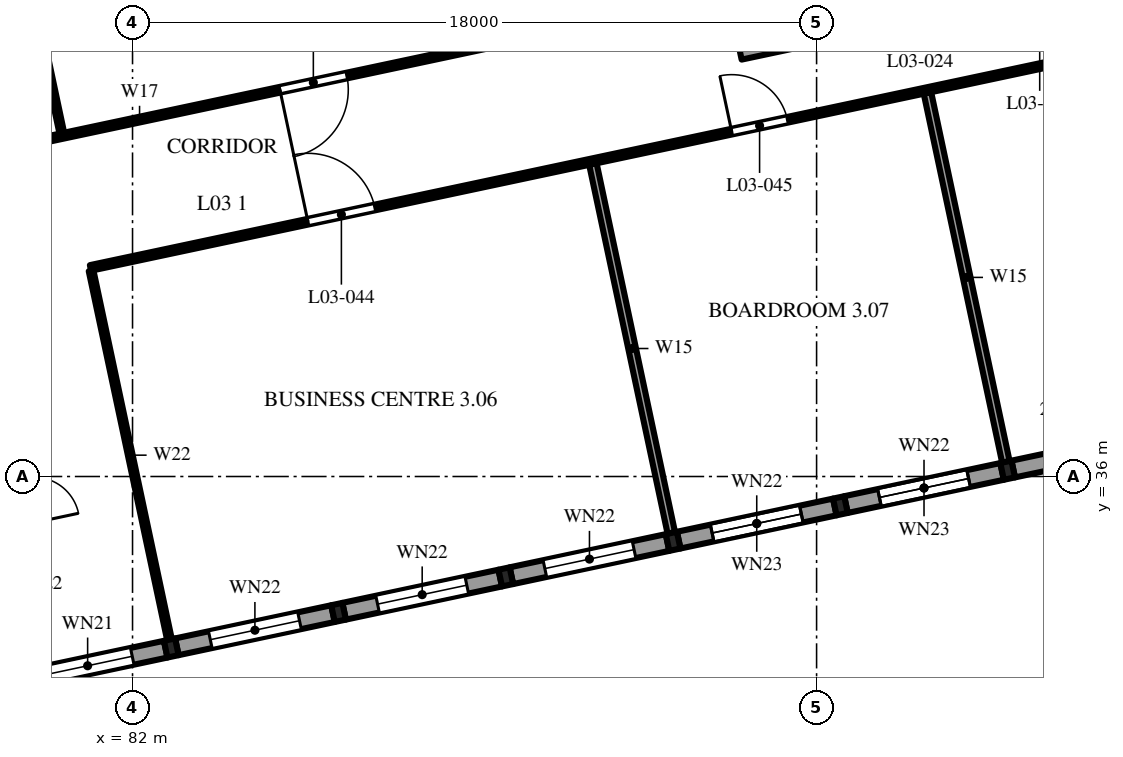
"""IFC4 building model, lengths in metres.
Left out: names, types, materials, properties, quantities, classifications, styles, units other than length and angle.
Written with IfcOpenShell. Run it as: python <this file> out.ifc"""

import sys

from ifc_helpers import new_model, si_unit, direction, frame, frame_2d, origin, origin_2d, place, context, subcontext, project, spatial, polyline, rectangle, i_section, outline, extrude, element, fill, save


model = new_model("IFC4")
c1 = context("Model", 3, precision=1e-05, world=origin(), true_north=direction((0.0, 1.0)))
c2 = subcontext(c1, "Body", "Model", "MODEL_VIEW")
j1 = project(units=[si_unit("LENGTHUNIT", "METRE"), si_unit("PLANEANGLEUNIT", "RADIAN")], contexts=[c1])
p1 = place(None, origin())
s1 = spatial("IfcSite", under=j1, at=p1, CompositionType="ELEMENT")
p2 = place(p1, origin())
s2 = spatial("IfcBuilding", under=s1, at=p2, CompositionType="ELEMENT")
p3 = place(p2, frame((0.0, 0.0, 16.8)))
s3 = spatial("IfcBuildingStorey", under=s2, at=p3, CompositionType="ELEMENT", Elevation=16.8)
for number, where, z_axis, x_axis in (
    (1, (83.019, 31.487, 0.0), (0.0, 0.0, 1.0), (0.978, 0.208, 0.0)),
    (2, (87.421, 32.423, 0.0), (0.0, 0.0, 1.0), (0.978, 0.208, 0.0)),
    (3, (91.823, 33.358, 0.0), (0.0, 0.0, 1.0), (0.978, 0.208, 0.0)),
    (4, (96.224, 34.294, 0.0), (0.0, 0.0, 1.0), (0.978, 0.208, 0.0)),
    (5, (100.626, 35.23, 0.0), (0.0, 0.0, 1.0), (0.978, 0.208, 0.0)),
    (6, (105.028, 36.165, 0.0), (0.0, 0.0, 1.0), (0.978, 0.208, 0.0)),
):
    element("IfcColumn", number, at=place(p3, frame(where, z_axis=z_axis, x_axis=x_axis)), inside=s3, PredefinedType="COLUMN", context=c2, shape_type="SweptSolid", body=[
        extrude(i_section(OverallWidth=0.3, OverallDepth=0.45, WebThickness=0.014, FlangeThickness=0.026, FilletRadius=0.027, at=origin_2d()), origin(), (0.0, 0.0, 1.0), 4.8),
    ])
p4 = place(p3, frame((97.997, 47.118, 0.0), z_axis=(0.0, 0.0, 1.0), x_axis=(0.978147662755, 0.20791139903, 0.0)))
e7 = element("IfcWall", 7, at=p4, inside=s3, PredefinedType="SHEAR", context=c2, shape_type="SweptSolid", body=[
    extrude(outline(polyline([(0.0, 0.0), (13.7, 0.0), (13.7, 9.076), (0.0, 8.344), (0.0, 0.0)])), frame((0.0, 0.15, 0.0), z_axis=(0.0, -1.0, 0.0), x_axis=(1.0, 0.0, 0.0)), (0.0, 0.0, 1.0), 0.3),
])
p5 = place(p4, frame((5.1, 0.0, 0.0)))
e8 = element("IfcOpeningElement", 8, at=p5, cuts=e7, PredefinedType="OPENING", context=c2, shape_type="SweptSolid", body=[
    extrude(rectangle(XDim=1.1, YDim=2.1, at=frame_2d((0.55, 1.05))), frame((0.0, 0.16, 0.0), z_axis=(0.0, -1.0, 0.0), x_axis=(1.0, 0.0, 0.0)), (0.0, 0.0, 1.0), 0.32),
])
p6 = place(p4, frame((7.5, 0.0, 0.0)))
e9 = element("IfcOpeningElement", 9, at=p6, cuts=e7, PredefinedType="OPENING", context=c2, shape_type="SweptSolid", body=[
    extrude(rectangle(XDim=1.1, YDim=2.1, at=frame_2d((0.55, 1.05))), frame((0.0, 0.16, 0.0), z_axis=(0.0, -1.0, 0.0), x_axis=(1.0, 0.0, 0.0)), (0.0, 0.0, 1.0), 0.32),
])
p7 = place(p3, frame((78.764, 30.583, 0.0), z_axis=(0.0, 0.0, 1.0), x_axis=(0.978143927149, 0.207928972925, 0.0)))
e10 = element("IfcWall", 10, at=p7, inside=s3, PredefinedType="SOLIDWALL", context=c2, shape_type="SweptSolid", body=[
    extrude(outline(polyline([(0.0, 0.0), (4.2, 0.0), (4.2, 9.316), (0.0, 9.091), (0.0, 0.0)])), frame((0.0, 0.225, 0.0), z_axis=(0.0, -1.0, 0.0), x_axis=(1.0, 0.0, 0.0)), (0.0, 0.0, 1.0), 0.45),
])
p8 = place(p7, frame((0.9, 0.0, 0.45)))
e11 = element("IfcOpeningElement", 11, at=p8, cuts=e10, PredefinedType="OPENING", context=c2, shape_type="SweptSolid", body=[
    extrude(rectangle(XDim=2.4, YDim=3.3, at=frame_2d((1.2, 1.65))), frame((0.0, 0.235, 0.0), z_axis=(0.0, -1.0, 0.0), x_axis=(1.0, 0.0, 0.0)), (0.0, 0.0, 1.0), 0.47),
])
p9 = place(p3, frame((83.166, 31.519, 0.0), z_axis=(0.0, 0.0, 1.0), x_axis=(0.978155748334, 0.207873355681, 0.0)))
e12 = element("IfcWall", 12, at=p9, inside=s3, PredefinedType="SOLIDWALL", context=c2, shape_type="SweptSolid", body=[
    extrude(outline(polyline([(0.0, 0.0), (4.2, 0.0), (4.2, 9.557), (0.0, 9.332), (0.0, 0.0)])), frame((0.0, 0.225, 0.0), z_axis=(0.0, -1.0, 0.0), x_axis=(1.0, 0.0, 0.0)), (0.0, 0.0, 1.0), 0.45),
])
p10 = place(p9, frame((0.9, 0.0, 0.9)))
e13 = element("IfcOpeningElement", 13, at=p10, cuts=e12, PredefinedType="OPENING", context=c2, shape_type="SweptSolid", body=[
    extrude(rectangle(XDim=2.4, YDim=2.4, at=frame_2d((1.2, 1.2))), frame((0.0, 0.235, 0.0), z_axis=(0.0, -1.0, 0.0), x_axis=(1.0, 0.0, 0.0)), (0.0, 0.0, 1.0), 0.47),
])
p11 = place(p3, frame((87.568, 32.454, 0.0), z_axis=(0.0, 0.0, 1.0), x_axis=(0.97815826, 0.207861536591, 0.0)))
e14 = element("IfcWall", 14, at=p11, inside=s3, PredefinedType="SOLIDWALL", context=c2, shape_type="SweptSolid", body=[
    extrude(outline(polyline([(0.0, 0.0), (4.2, 0.0), (4.2, 9.797), (0.0, 9.573), (0.0, 0.0)])), frame((0.0, 0.225, 0.0), z_axis=(0.0, -1.0, 0.0), x_axis=(1.0, 0.0, 0.0)), (0.0, 0.0, 1.0), 0.45),
])
p12 = place(p11, frame((0.9, 0.0, 0.9)))
e15 = element("IfcOpeningElement", 15, at=p12, cuts=e14, PredefinedType="OPENING", context=c2, shape_type="SweptSolid", body=[
    extrude(rectangle(XDim=2.4, YDim=2.4, at=frame_2d((1.2, 1.2))), frame((0.0, 0.235, 0.0), z_axis=(0.0, -1.0, 0.0), x_axis=(1.0, 0.0, 0.0)), (0.0, 0.0, 1.0), 0.47),
])
p13 = place(p3, frame((91.969, 33.39, 0.0), z_axis=(0.0, 0.0, 1.0), x_axis=(0.978143927149, 0.207928972925, 0.0)))
e16 = element("IfcWall", 16, at=p13, inside=s3, PredefinedType="SOLIDWALL", context=c2, shape_type="SweptSolid", body=[
    extrude(outline(polyline([(0.0, 0.0), (4.2, 0.0), (4.2, 10.038), (0.0, 9.813), (0.0, 0.0)])), frame((0.0, 0.225, 0.0), z_axis=(0.0, -1.0, 0.0), x_axis=(1.0, 0.0, 0.0)), (0.0, 0.0, 1.0), 0.45),
])
p14 = place(p13, frame((0.9, 0.0, 0.9)))
e17 = element("IfcOpeningElement", 17, at=p14, cuts=e16, PredefinedType="OPENING", context=c2, shape_type="SweptSolid", body=[
    extrude(rectangle(XDim=2.4, YDim=2.4, at=frame_2d((1.2, 1.2))), frame((0.0, 0.235, 0.0), z_axis=(0.0, -1.0, 0.0), x_axis=(1.0, 0.0, 0.0)), (0.0, 0.0, 1.0), 0.47),
])
p15 = place(p3, frame((96.371, 34.325, 0.0), z_axis=(0.0, 0.0, 1.0), x_axis=(0.978143927149, 0.207928972925, 0.0)))
e18 = element("IfcWall", 18, at=p15, inside=s3, PredefinedType="SOLIDWALL", context=c2, shape_type="SweptSolid", body=[
    extrude(outline(polyline([(0.0, 0.0), (4.2, 0.0), (4.2, 10.279), (0.0, 10.054), (0.0, 0.0)])), frame((0.0, 0.225, 0.0), z_axis=(0.0, -1.0, 0.0), x_axis=(1.0, 0.0, 0.0)), (0.0, 0.0, 1.0), 0.45),
])
p16 = place(p15, frame((0.9, 0.0, 0.6)))
e19 = element("IfcOpeningElement", 19, at=p16, cuts=e18, PredefinedType="OPENING", context=c2, shape_type="SweptSolid", body=[
    extrude(rectangle(XDim=2.4, YDim=2.7, at=frame_2d((1.2, 1.35))), frame((0.0, 0.235, 0.0), z_axis=(0.0, -1.0, 0.0), x_axis=(1.0, 0.0, 0.0)), (0.0, 0.0, 1.0), 0.47),
])
p17 = place(p15, frame((0.9, 0.0, 5.1)))
e20 = element("IfcOpeningElement", 20, at=p17, cuts=e18, PredefinedType="OPENING", context=c2, shape_type="SweptSolid", body=[
    extrude(rectangle(XDim=2.4, YDim=2.4, at=frame_2d((1.2, 1.2))), frame((0.0, 0.235, 0.0), z_axis=(0.0, -1.0, 0.0), x_axis=(1.0, 0.0, 0.0)), (0.0, 0.0, 1.0), 0.47),
])
p18 = place(p3, frame((100.773, 35.261, 0.0), z_axis=(0.0, 0.0, 1.0), x_axis=(0.978143927149, 0.207928972925, 0.0)))
e21 = element("IfcWall", 21, at=p18, inside=s3, PredefinedType="SOLIDWALL", context=c2, shape_type="SweptSolid", body=[
    extrude(outline(polyline([(0.0, 0.0), (4.2, 0.0), (4.2, 10.52), (0.0, 10.295), (0.0, 0.0)])), frame((0.0, 0.225, 0.0), z_axis=(0.0, -1.0, 0.0), x_axis=(1.0, 0.0, 0.0)), (0.0, 0.0, 1.0), 0.45),
])
p19 = place(p18, frame((0.9, 0.0, 0.6)))
e22 = element("IfcOpeningElement", 22, at=p19, cuts=e21, PredefinedType="OPENING", context=c2, shape_type="SweptSolid", body=[
    extrude(rectangle(XDim=2.4, YDim=2.7, at=frame_2d((1.2, 1.35))), frame((0.0, 0.235, 0.0), z_axis=(0.0, -1.0, 0.0), x_axis=(1.0, 0.0, 0.0)), (0.0, 0.0, 1.0), 0.47),
])
p20 = place(p18, frame((0.9, 0.0, 5.1)))
e23 = element("IfcOpeningElement", 23, at=p20, cuts=e21, PredefinedType="OPENING", context=c2, shape_type="SweptSolid", body=[
    extrude(rectangle(XDim=2.4, YDim=2.4, at=frame_2d((1.2, 1.2))), frame((0.0, 0.235, 0.0), z_axis=(0.0, -1.0, 0.0), x_axis=(1.0, 0.0, 0.0)), (0.0, 0.0, 1.0), 0.47),
])
p21 = place(p3, frame((105.174, 36.197, 0.0), z_axis=(0.0, 0.0, 1.0), x_axis=(0.978155748334, 0.207873355681, 0.0)))
e24 = element("IfcWall", 24, at=p21, inside=s3, PredefinedType="SOLIDWALL", context=c2, shape_type="SweptSolid", body=[
    extrude(outline(polyline([(0.0, 0.0), (4.2, 0.0), (4.2, 10.76), (0.0, 10.536), (0.0, 0.0)])), frame((0.0, 0.225, 0.0), z_axis=(0.0, -1.0, 0.0), x_axis=(1.0, 0.0, 0.0)), (0.0, 0.0, 1.0), 0.45),
])
p22 = place(p21, frame((0.9, 0.0, 0.9)))
e25 = element("IfcOpeningElement", 25, at=p22, cuts=e24, PredefinedType="OPENING", context=c2, shape_type="SweptSolid", body=[
    extrude(rectangle(XDim=2.4, YDim=2.4, at=frame_2d((1.2, 1.2))), frame((0.0, 0.235, 0.0), z_axis=(0.0, -1.0, 0.0), x_axis=(1.0, 0.0, 0.0)), (0.0, 0.0, 1.0), 0.47),
])
p23 = place(p21, frame((0.9, 0.0, 5.1)))
e26 = element("IfcOpeningElement", 26, at=p23, cuts=e24, PredefinedType="OPENING", context=c2, shape_type="SweptSolid", body=[
    extrude(rectangle(XDim=2.4, YDim=2.4, at=frame_2d((1.2, 1.2))), frame((0.0, 0.235, 0.0), z_axis=(0.0, -1.0, 0.0), x_axis=(1.0, 0.0, 0.0)), (0.0, 0.0, 1.0), 0.47),
])
p24 = place(p3, frame((80.893, 41.489, 0.0), z_axis=(0.0, 0.0, 1.0), x_axis=(0.97814724207, 0.20791337819, 0.0)))
e27 = element("IfcWall", 27, at=p24, inside=s3, PredefinedType="PARTITIONING", context=c2, shape_type="SweptSolid", body=[
    extrude(outline(polyline([(0.0, 0.0), (49.5, 0.0), (49.5, 9.336), (0.0, 6.688), (0.0, 0.0)])), frame((0.0, 0.075, 0.0), z_axis=(0.0, -1.0, 0.0), x_axis=(1.0, 0.0, 0.0)), (0.0, 0.0, 1.0), 0.15),
])
p25 = place(p24, frame((5.85, 0.0, 0.0)))
e28 = element("IfcOpeningElement", 28, at=p25, cuts=e27, PredefinedType="OPENING", context=c2, shape_type="SweptSolid", body=[
    extrude(rectangle(XDim=1.8, YDim=2.1, at=frame_2d((0.9, 1.05))), frame((0.0, 0.085, 0.0), z_axis=(0.0, -1.0, 0.0), x_axis=(1.0, 0.0, 0.0)), (0.0, 0.0, 1.0), 0.17),
])
p26 = place(p24, frame((17.25, 0.0, 0.0)))
e29 = element("IfcOpeningElement", 29, at=p26, cuts=e27, PredefinedType="OPENING", context=c2, shape_type="SweptSolid", body=[
    extrude(rectangle(XDim=1.5, YDim=2.1, at=frame_2d((0.75, 1.05))), frame((0.0, 0.085, 0.0), z_axis=(0.0, -1.0, 0.0), x_axis=(1.0, 0.0, 0.0)), (0.0, 0.0, 1.0), 0.17),
])
p27 = place(p24, frame((28.35, 0.0, 0.0)))
e30 = element("IfcOpeningElement", 30, at=p27, cuts=e27, PredefinedType="OPENING", context=c2, shape_type="SweptSolid", body=[
    extrude(rectangle(XDim=1.8, YDim=2.1, at=frame_2d((0.9, 1.05))), frame((0.0, 0.085, 0.0), z_axis=(0.0, -1.0, 0.0), x_axis=(1.0, 0.0, 0.0)), (0.0, 0.0, 1.0), 0.17),
])
p28 = place(p24, frame((41.85, 0.0, 0.0)))
e31 = element("IfcOpeningElement", 31, at=p28, cuts=e27, PredefinedType="OPENING", context=c2, shape_type="SweptSolid", body=[
    extrude(rectangle(XDim=1.8, YDim=2.1, at=frame_2d((0.9, 1.05))), frame((0.0, 0.085, 0.0), z_axis=(0.0, -1.0, 0.0), x_axis=(1.0, 0.0, 0.0)), (0.0, 0.0, 1.0), 0.17),
])
p29 = place(p3, frame((82.972, 31.707, 0.0), z_axis=(0.0, 0.0, 1.0), x_axis=(-0.207904355568, 0.978149159861, 0.0)))
e32 = element("IfcWall", 32, at=p29, inside=s3, PredefinedType="PARTITIONING", context=c2, shape_type="SweptSolid", body=[
    extrude(outline(polyline([(0.0, 0.0), (9.925, 0.0), (9.925, 5.973), (0.0, 5.973), (0.0, 0.0)])), frame((0.0, 0.062, 0.0), z_axis=(0.0, -1.0, 0.0), x_axis=(1.0, 0.0, 0.0)), (0.0, 0.0, 1.0), 0.125),
])
p30 = place(p3, frame((96.177, 34.514, 0.0), z_axis=(0.0, 0.0, 1.0), x_axis=(-0.20790935802, 0.978148096582, 0.0)))
e33 = element("IfcWall", 33, at=p30, inside=s3, PredefinedType="PARTITIONING", context=c2, shape_type="SweptSolid", body=[
    extrude(outline(polyline([(0.0, 0.0), (9.925, 0.0), (9.925, 6.696), (0.0, 6.696), (0.0, 0.0)])), frame((0.0, 0.1, 0.0), z_axis=(0.0, -1.0, 0.0), x_axis=(1.0, 0.0, 0.0)), (0.0, 0.0, 1.0), 0.2),
])
p31 = place(p3, frame((104.981, 36.385, 0.0), z_axis=(0.0, 0.0, 1.0), x_axis=(-0.207927890391, 0.978144157268, 0.0)))
e34 = element("IfcWall", 34, at=p31, inside=s3, PredefinedType="PARTITIONING", context=c2, shape_type="SweptSolid", body=[
    extrude(outline(polyline([(0.0, 0.0), (9.925, 0.0), (9.925, 7.896), (0.0, 8.097), (0.0, 0.0)])), frame((0.0, 0.1, 0.0), z_axis=(0.0, -1.0, 0.0), x_axis=(1.0, 0.0, 0.0)), (0.0, 0.0, 1.0), 0.2),
])
p32 = place(p3, frame((59.663, 40.605, 0.0), z_axis=(0.0, 0.0, 1.0), x_axis=(0.978147466509, 0.207912322295, 0.0)))
e35 = element("IfcWall", 35, at=p32, inside=s3, PredefinedType="PARTITIONING", context=c2, shape_type="SweptSolid", body=[
    extrude(outline(polyline([(0.0, 0.0), (34.45, 0.0), (34.45, 7.224), (0.0, 5.381), (0.0, 0.0)])), frame((0.0, 0.075, 0.0), z_axis=(0.0, -1.0, 0.0), x_axis=(1.0, 0.0, 0.0)), (0.0, 0.0, 1.0), 0.15),
])
p33 = place(p32, frame((3.225, 0.0, 0.0)))
e36 = element("IfcOpeningElement", 36, at=p33, cuts=e35, PredefinedType="OPENING", context=c2, shape_type="SweptSolid", body=[
    extrude(rectangle(XDim=1.0, YDim=2.1, at=frame_2d((0.5, 1.05))), frame((0.0, 0.085, 0.0), z_axis=(0.0, -1.0, 0.0), x_axis=(1.0, 0.0, 0.0)), (0.0, 0.0, 1.0), 0.17),
])
p34 = place(p32, frame((9.25, 0.0, 0.0)))
e37 = element("IfcOpeningElement", 37, at=p34, cuts=e35, PredefinedType="OPENING", context=c2, shape_type="SweptSolid", body=[
    extrude(rectangle(XDim=0.9, YDim=2.1, at=frame_2d((0.45, 1.05))), frame((0.0, 0.085, 0.0), z_axis=(0.0, -1.0, 0.0), x_axis=(1.0, 0.0, 0.0)), (0.0, 0.0, 1.0), 0.17),
])
p35 = place(p32, frame((13.75, 0.0, 0.0)))
e38 = element("IfcOpeningElement", 38, at=p35, cuts=e35, PredefinedType="OPENING", context=c2, shape_type="SweptSolid", body=[
    extrude(rectangle(XDim=0.9, YDim=2.1, at=frame_2d((0.45, 1.05))), frame((0.0, 0.085, 0.0), z_axis=(0.0, -1.0, 0.0), x_axis=(1.0, 0.0, 0.0)), (0.0, 0.0, 1.0), 0.17),
])
p36 = place(p32, frame((18.15, 0.0, 0.0)))
e39 = element("IfcOpeningElement", 39, at=p36, cuts=e35, PredefinedType="OPENING", context=c2, shape_type="SweptSolid", body=[
    extrude(rectangle(XDim=1.1, YDim=2.1, at=frame_2d((0.55, 1.05))), frame((0.0, 0.085, 0.0), z_axis=(0.0, -1.0, 0.0), x_axis=(1.0, 0.0, 0.0)), (0.0, 0.0, 1.0), 0.17),
])
p37 = place(p32, frame((26.8, 0.0, 0.0)))
e40 = element("IfcOpeningElement", 40, at=p37, cuts=e35, PredefinedType="OPENING", context=c2, shape_type="SweptSolid", body=[
    extrude(rectangle(XDim=1.8, YDim=2.1, at=frame_2d((0.9, 1.05))), frame((0.0, 0.085, 0.0), z_axis=(0.0, -1.0, 0.0), x_axis=(1.0, 0.0, 0.0)), (0.0, 0.0, 1.0), 0.17),
])
p38 = place(p3, frame((78.076, 54.743, 0.0), z_axis=(0.0, 0.0, 1.0), x_axis=(0.20790935802, -0.978148096582, 0.0)))
e41 = element("IfcWall", 41, at=p38, inside=s3, PredefinedType="PARTITIONING", context=c2, shape_type="SweptSolid", body=[
    extrude(outline(polyline([(0.0, 0.0), (9.925, 0.0), (9.925, 5.973), (0.0, 5.973), (0.0, 0.0)])), frame((0.0, 0.062, 0.0), z_axis=(0.0, -1.0, 0.0), x_axis=(1.0, 0.0, 0.0)), (0.0, 0.0, 1.0), 0.125),
])
p39 = place(p8, origin())
e42 = element("IfcWindow", 42, at=p39, inside=s3, PartitioningType="DOUBLE_PANEL_VERTICAL", PredefinedType="WINDOW", context=c2, shape_type="SweptSolid", body=[
    extrude(rectangle(XDim=2.4, YDim=3.3, at=frame_2d((1.2, 1.65))), frame((0.0, 0.03, 0.0), z_axis=(0.0, -1.0, 0.0), x_axis=(1.0, 0.0, 0.0)), (0.0, 0.0, 1.0), 0.06),
])
fill(e11, e42)
p40 = place(p10, origin())
e43 = element("IfcWindow", 43, at=p40, inside=s3, PartitioningType="SINGLE_PANEL", PredefinedType="WINDOW", context=c2, shape_type="SweptSolid", body=[
    extrude(rectangle(XDim=2.4, YDim=2.4, at=frame_2d((1.2, 1.2))), frame((0.0, 0.03, 0.0), z_axis=(0.0, -1.0, 0.0), x_axis=(1.0, 0.0, 0.0)), (0.0, 0.0, 1.0), 0.06),
])
fill(e13, e43)
p41 = place(p12, origin())
e44 = element("IfcWindow", 44, at=p41, inside=s3, PartitioningType="SINGLE_PANEL", PredefinedType="WINDOW", context=c2, shape_type="SweptSolid", body=[
    extrude(rectangle(XDim=2.4, YDim=2.4, at=frame_2d((1.2, 1.2))), frame((0.0, 0.03, 0.0), z_axis=(0.0, -1.0, 0.0), x_axis=(1.0, 0.0, 0.0)), (0.0, 0.0, 1.0), 0.06),
])
fill(e15, e44)
p42 = place(p14, origin())
e45 = element("IfcWindow", 45, at=p42, inside=s3, PartitioningType="SINGLE_PANEL", PredefinedType="WINDOW", context=c2, shape_type="SweptSolid", body=[
    extrude(rectangle(XDim=2.4, YDim=2.4, at=frame_2d((1.2, 1.2))), frame((0.0, 0.03, 0.0), z_axis=(0.0, -1.0, 0.0), x_axis=(1.0, 0.0, 0.0)), (0.0, 0.0, 1.0), 0.06),
])
fill(e17, e45)
p43 = place(p16, origin())
e46 = element("IfcWindow", 46, at=p43, inside=s3, PartitioningType="SINGLE_PANEL", PredefinedType="WINDOW", context=c2, shape_type="SweptSolid", body=[
    extrude(rectangle(XDim=2.4, YDim=2.7, at=frame_2d((1.2, 1.35))), frame((0.0, 0.03, 0.0), z_axis=(0.0, -1.0, 0.0), x_axis=(1.0, 0.0, 0.0)), (0.0, 0.0, 1.0), 0.06),
])
fill(e19, e46)
p44 = place(p17, origin())
e47 = element("IfcWindow", 47, at=p44, inside=s3, PartitioningType="SINGLE_PANEL", PredefinedType="WINDOW", context=c2, shape_type="SweptSolid", body=[
    extrude(rectangle(XDim=2.4, YDim=2.4, at=frame_2d((1.2, 1.2))), frame((0.0, 0.03, 0.0), z_axis=(0.0, -1.0, 0.0), x_axis=(1.0, 0.0, 0.0)), (0.0, 0.0, 1.0), 0.06),
])
fill(e20, e47)
p45 = place(p19, origin())
e48 = element("IfcWindow", 48, at=p45, inside=s3, PartitioningType="SINGLE_PANEL", PredefinedType="WINDOW", context=c2, shape_type="SweptSolid", body=[
    extrude(rectangle(XDim=2.4, YDim=2.7, at=frame_2d((1.2, 1.35))), frame((0.0, 0.03, 0.0), z_axis=(0.0, -1.0, 0.0), x_axis=(1.0, 0.0, 0.0)), (0.0, 0.0, 1.0), 0.06),
])
fill(e22, e48)
p46 = place(p20, origin())
e49 = element("IfcWindow", 49, at=p46, inside=s3, PartitioningType="SINGLE_PANEL", PredefinedType="WINDOW", context=c2, shape_type="SweptSolid", body=[
    extrude(rectangle(XDim=2.4, YDim=2.4, at=frame_2d((1.2, 1.2))), frame((0.0, 0.03, 0.0), z_axis=(0.0, -1.0, 0.0), x_axis=(1.0, 0.0, 0.0)), (0.0, 0.0, 1.0), 0.06),
])
fill(e23, e49)
p47 = place(p25, origin())
e50 = element("IfcDoor", 50, at=p47, inside=s3, OperationType="DOUBLE_DOOR_SINGLE_SWING", PredefinedType="DOOR", context=c2, shape_type="SweptSolid", body=[
    extrude(rectangle(XDim=1.8, YDim=2.1, at=frame_2d((0.9, 1.05))), frame((0.0, 0.025, 0.0), z_axis=(0.0, -1.0, 0.0), x_axis=(1.0, 0.0, 0.0)), (0.0, 0.0, 1.0), 0.05),
])
fill(e28, e50)
p48 = place(p26, origin())
e51 = element("IfcDoor", 51, at=p48, inside=s3, OperationType="DOUBLE_DOOR_SINGLE_SWING", PredefinedType="DOOR", context=c2, shape_type="SweptSolid", body=[
    extrude(rectangle(XDim=1.5, YDim=2.1, at=frame_2d((0.75, 1.05))), frame((0.0, 0.025, 0.0), z_axis=(0.0, -1.0, 0.0), x_axis=(1.0, 0.0, 0.0)), (0.0, 0.0, 1.0), 0.05),
])
fill(e29, e51)
p49 = place(p37, frame((1.8, 0.0, 0.0), z_axis=(0.0, 0.0, 1.0), x_axis=(-1.0, 0.0, 0.0)))
e52 = element("IfcDoor", 52, at=p49, inside=s3, OperationType="DOUBLE_DOOR_SINGLE_SWING", PredefinedType="DOOR", context=c2, shape_type="SweptSolid", body=[
    extrude(rectangle(XDim=1.8, YDim=2.1, at=frame_2d((0.9, 1.05))), frame((0.0, 0.025, 0.0), z_axis=(0.0, -1.0, 0.0), x_axis=(1.0, 0.0, 0.0)), (0.0, 0.0, 1.0), 0.05),
])
fill(e40, e52)
save(model, sys.argv[1])
